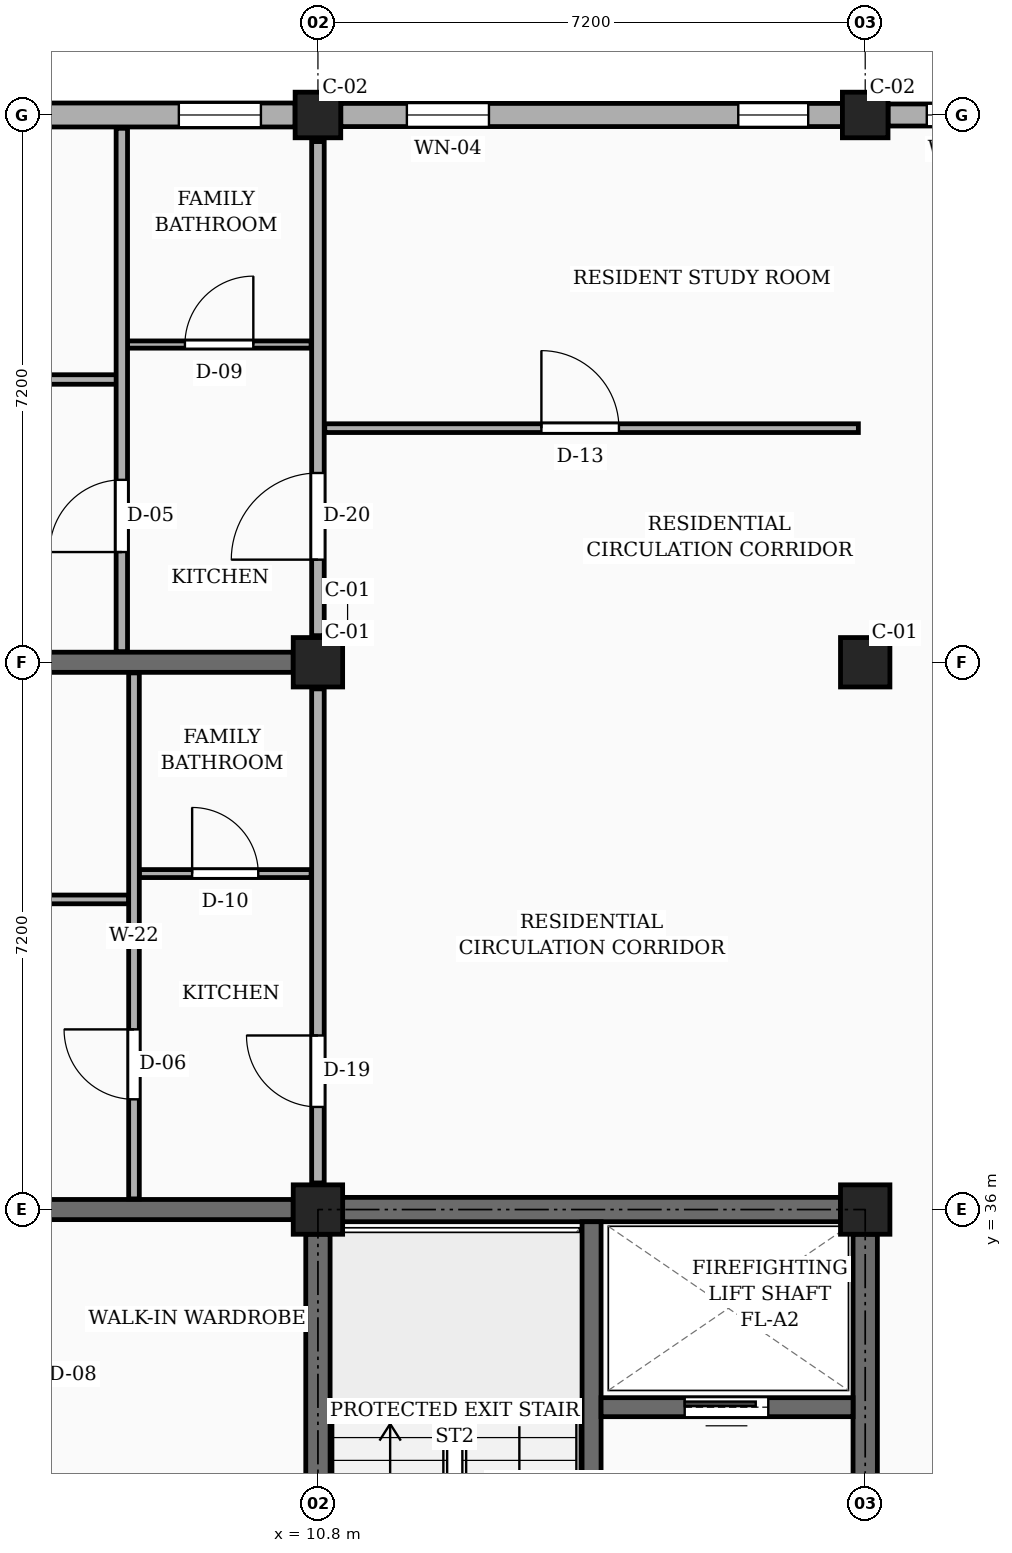
"""IFC4 building model, lengths in metres.
Left out: names, types, materials, properties, quantities, classifications, styles, units other than length and angle.
Written with IfcOpenShell. Run it as: python <this file> out.ifc"""

import sys

from ifc_helpers import new_model, si_unit, direction, frame, frame_2d, origin, origin_2d, place, context, subcontext, project, spatial, rectangle, extrude, element, fill, save


model = new_model("IFC4")
c1 = context("Model", 3, precision=1e-05, world=origin(), true_north=direction((0.0, 1.0)))
c2 = subcontext(c1, "Body", "Model", "MODEL_VIEW")
j1 = project(units=[si_unit("LENGTHUNIT", "METRE"), si_unit("PLANEANGLEUNIT", "RADIAN")], contexts=[c1])
p1 = place(None, origin())
s1 = spatial("IfcSite", under=j1, at=p1, CompositionType="ELEMENT")
p2 = place(p1, origin())
s2 = spatial("IfcBuilding", under=s1, at=p2, CompositionType="ELEMENT")
p3 = place(p2, frame((0.0, 0.0, 4.5)))
s3 = spatial("IfcBuildingStorey", under=s2, at=p3, CompositionType="ELEMENT", Elevation=4.5)
for number, where, z_axis, x_axis in (
    (1, (10.8, 36.0, 0.0), (0.0, 0.0, 1.0), (1.0, 0.0, 0.0)),
    (2, (10.8, 43.2, 0.0), (0.0, 0.0, 1.0), (1.0, 0.0, 0.0)),
):
    element("IfcColumn", number, at=place(p3, frame(where, z_axis=z_axis, x_axis=x_axis)), inside=s3, PredefinedType="COLUMN", context=c2, shape_type="SweptSolid", body=[
        extrude(rectangle(XDim=0.65, YDim=0.65, at=origin_2d()), origin(), (0.0, 0.0, 1.0), 3.15),
    ])
p4 = place(p3, frame((10.8, 50.4, 0.0), z_axis=(0.0, 0.0, 1.0), x_axis=(1.0, 0.0, 0.0)))
e3 = element("IfcColumn", 3, at=p4, inside=s3, PredefinedType="COLUMN", context=c2, shape_type="SweptSolid", body=[
    extrude(rectangle(XDim=0.6, YDim=0.6, at=origin_2d()), origin(), (0.0, 0.0, 1.0), 3.15),
])
for number, where, z_axis, x_axis in (
    (4, (18.0, 36.0, 0.0), (0.0, 0.0, 1.0), (1.0, 0.0, 0.0)),
    (5, (18.0, 43.2, 0.0), (0.0, 0.0, 1.0), (1.0, 0.0, 0.0)),
):
    element("IfcColumn", number, at=place(p3, frame(where, z_axis=z_axis, x_axis=x_axis)), inside=s3, PredefinedType="COLUMN", context=c2, shape_type="SweptSolid", body=[
        extrude(rectangle(XDim=0.65, YDim=0.65, at=origin_2d()), origin(), (0.0, 0.0, 1.0), 3.15),
    ])
p5 = place(p3, frame((18.0, 50.4, 0.0), z_axis=(0.0, 0.0, 1.0), x_axis=(1.0, 0.0, 0.0)))
e6 = element("IfcColumn", 6, at=p5, inside=s3, PredefinedType="COLUMN", context=c2, shape_type="SweptSolid", body=[
    extrude(rectangle(XDim=0.6, YDim=0.6, at=origin_2d()), origin(), (0.0, 0.0, 1.0), 3.15),
])
for number, where, z_axis, x_axis in (
    (7, (3.9, 36.0, 0.0), (0.0, 0.0, 1.0), (1.0, 0.0, 0.0)),
    (8, (3.9, 43.2, 0.0), (0.0, 0.0, 1.0), (1.0, 0.0, 0.0)),
):
    element("IfcWall", number, at=place(p3, frame(where, z_axis=z_axis, x_axis=x_axis)), inside=s3, PredefinedType="SOLIDWALL", context=c2, shape_type="SweptSolid", body=[
        extrude(rectangle(XDim=6.575, YDim=0.265, at=frame_2d((3.288, 0.0))), origin(), (0.0, 0.0, 1.0), 2.17),
    ])
p6 = place(p3, frame((24.9, 50.4, 0.0), z_axis=(0.0, 0.0, 1.0), x_axis=(-1.0, 0.0, 0.0)))
e9 = element("IfcWall", 9, at=p6, inside=s3, PredefinedType="SOLIDWALL", context=c2, shape_type="SweptSolid", body=[
    extrude(rectangle(XDim=6.6, YDim=0.29, at=frame_2d((3.3, 0.0))), origin(), (0.0, 0.0, 1.0), 2.44),
])
p7 = place(p6, frame((1.925, 0.0, 0.78)))
e10 = element("IfcOpeningElement", 10, at=p7, cuts=e9, PredefinedType="OPENING", context=c2, shape_type="SweptSolid", body=[
    extrude(rectangle(XDim=1.45, YDim=1.44, at=frame_2d((0.725, 0.72))), frame((0.0, 0.155, 0.0), z_axis=(0.0, -1.0, 0.0), x_axis=(1.0, 0.0, 0.0)), (0.0, 0.0, 1.0), 0.31),
])
p8 = place(p6, frame((5.17, 0.0, 0.78)))
e11 = element("IfcOpeningElement", 11, at=p8, cuts=e9, PredefinedType="OPENING", context=c2, shape_type="SweptSolid", body=[
    extrude(rectangle(XDim=0.92, YDim=1.15, at=frame_2d((0.46, 0.575))), frame((0.0, 0.155, 0.0), z_axis=(0.0, -1.0, 0.0), x_axis=(1.0, 0.0, 0.0)), (0.0, 0.0, 1.0), 0.31),
])
p9 = place(p3, frame((17.7, 50.4, 0.0), z_axis=(0.0, 0.0, 1.0), x_axis=(-1.0, 0.0, 0.0)))
e12 = element("IfcWall", 12, at=p9, inside=s3, PredefinedType="SOLIDWALL", context=c2, shape_type="SweptSolid", body=[
    extrude(rectangle(XDim=6.6, YDim=0.305, at=frame_2d((3.3, 0.0))), origin(), (0.0, 0.0, 1.0), 2.44),
])
p10 = place(p9, frame((0.45, 0.0, 0.78)))
e13 = element("IfcOpeningElement", 13, at=p10, cuts=e12, PredefinedType="OPENING", context=c2, shape_type="SweptSolid", body=[
    extrude(rectangle(XDim=0.92, YDim=1.15, at=frame_2d((0.46, 0.575))), frame((0.0, 0.163, 0.0), z_axis=(0.0, -1.0, 0.0), x_axis=(1.0, 0.0, 0.0)), (0.0, 0.0, 1.0), 0.325),
])
p11 = place(p9, frame((4.65, 0.0, 0.78)))
e14 = element("IfcOpeningElement", 14, at=p11, cuts=e12, PredefinedType="OPENING", context=c2, shape_type="SweptSolid", body=[
    extrude(rectangle(XDim=1.08, YDim=1.15, at=frame_2d((0.54, 0.575))), frame((0.0, 0.163, 0.0), z_axis=(0.0, -1.0, 0.0), x_axis=(1.0, 0.0, 0.0)), (0.0, 0.0, 1.0), 0.325),
])
p12 = place(p3, frame((10.5, 50.4, 0.0), z_axis=(0.0, 0.0, 1.0), x_axis=(-1.0, 0.0, 0.0)))
e15 = element("IfcWall", 15, at=p12, inside=s3, PredefinedType="SOLIDWALL", context=c2, shape_type="SweptSolid", body=[
    extrude(rectangle(XDim=6.6, YDim=0.315, at=frame_2d((3.3, 0.0))), origin(), (0.0, 0.0, 1.0), 2.44),
])
p13 = place(p12, frame((0.45, 0.0, 0.78)))
e16 = element("IfcOpeningElement", 16, at=p13, cuts=e15, PredefinedType="OPENING", context=c2, shape_type="SweptSolid", body=[
    extrude(rectangle(XDim=1.08, YDim=1.15, at=frame_2d((0.54, 0.575))), frame((0.0, 0.167, 0.0), z_axis=(0.0, -1.0, 0.0), x_axis=(1.0, 0.0, 0.0)), (0.0, 0.0, 1.0), 0.335),
])
p14 = place(p12, frame((4.65, 0.0, 0.78)))
e17 = element("IfcOpeningElement", 17, at=p14, cuts=e15, PredefinedType="OPENING", context=c2, shape_type="SweptSolid", body=[
    extrude(rectangle(XDim=1.24, YDim=1.15, at=frame_2d((0.62, 0.575))), frame((0.0, 0.167, 0.0), z_axis=(0.0, -1.0, 0.0), x_axis=(1.0, 0.0, 0.0)), (0.0, 0.0, 1.0), 0.335),
])
for number, where, z_axis, x_axis in (
    (18, (10.8, 29.125, 0.0), (0.0, 0.0, 1.0), (0.0, 1.0, 0.0)),
    (19, (11.125, 36.0, 0.0), (0.0, 0.0, 1.0), (1.0, 0.0, 0.0)),
):
    element("IfcWall", number, at=place(p3, frame(where, z_axis=z_axis, x_axis=x_axis)), inside=s3, PredefinedType="SHEAR", context=c2, shape_type="SweptSolid", body=[
        extrude(rectangle(XDim=6.55, YDim=0.32, at=frame_2d((3.275, 0.0))), origin(), (0.0, 0.0, 1.0), 2.87),
    ])
p15 = place(p3, frame((18.0, 29.125, 0.0), z_axis=(0.0, 0.0, 1.0), x_axis=(0.0, 1.0, 0.0)))
e20 = element("IfcWall", 20, at=p15, inside=s3, PredefinedType="SHEAR", context=c2, shape_type="SweptSolid", body=[
    extrude(rectangle(XDim=6.55, YDim=0.32, at=frame_2d((3.275, 0.0))), origin(), (0.0, 0.0, 1.0), 2.87),
])
p16 = place(p15, frame((1.5, 0.0, 0.0)))
e21 = element("IfcOpeningElement", 21, at=p16, cuts=e20, PredefinedType="OPENING", context=c2, shape_type="SweptSolid", body=[
    extrude(rectangle(XDim=1.1, YDim=2.15, at=frame_2d((0.55, 1.075))), frame((0.0, 0.17, 0.0), z_axis=(0.0, -1.0, 0.0), x_axis=(1.0, 0.0, 0.0)), (0.0, 0.0, 1.0), 0.34),
])
p17 = place(p3, frame((14.4, 28.96, 0.0), z_axis=(0.0, 0.0, 1.0), x_axis=(0.0, 1.0, 0.0)))
e22 = element("IfcWall", 22, at=p17, inside=s3, PredefinedType="SHEAR", context=c2, shape_type="SweptSolid", body=[
    extrude(rectangle(XDim=6.88, YDim=0.25, at=frame_2d((3.44, 0.0))), origin(), (0.0, 0.0, 1.0), 2.87),
])
p18 = place(p17, frame((0.44, 0.0, 0.0)))
e23 = element("IfcOpeningElement", 23, at=p18, cuts=e22, PredefinedType="OPENING", context=c2, shape_type="SweptSolid", body=[
    extrude(rectangle(XDim=1.05, YDim=2.15, at=frame_2d((0.525, 1.075))), frame((0.0, 0.135, 0.0), z_axis=(0.0, -1.0, 0.0), x_axis=(1.0, 0.0, 0.0)), (0.0, 0.0, 1.0), 0.27),
])
p19 = place(p3, frame((14.525, 33.4, 0.0), z_axis=(0.0, 0.0, 1.0), x_axis=(1.0, 0.0, 0.0)))
e24 = element("IfcWall", 24, at=p19, inside=s3, PredefinedType="SHEAR", context=c2, shape_type="SweptSolid", body=[
    extrude(rectangle(XDim=3.315, YDim=0.25, at=frame_2d((1.658, 0.0))), origin(), (0.0, 0.0, 1.0), 2.87),
])
p20 = place(p19, frame((1.1, 0.0, 0.0)))
e25 = element("IfcOpeningElement", 25, at=p20, cuts=e24, PredefinedType="OPENING", context=c2, shape_type="SweptSolid", body=[
    extrude(rectangle(XDim=1.1, YDim=2.2, at=frame_2d((0.55, 1.1))), frame((0.0, 0.135, 0.0), z_axis=(0.0, -1.0, 0.0), x_axis=(1.0, 0.0, 0.0)), (0.0, 0.0, 1.0), 0.27),
])
p21 = place(p3, frame((10.8, 36.35, 0.0), z_axis=(0.0, 0.0, 1.0), x_axis=(0.0, 1.0, 0.0)))
e26 = element("IfcWall", 26, at=p21, inside=s3, PredefinedType="PARTITIONING", context=c2, shape_type="SweptSolid", body=[
    extrude(rectangle(XDim=6.5, YDim=0.165, at=frame_2d((3.25, 0.0))), origin(), (0.0, 0.0, 1.0), 2.22),
])
p22 = place(p21, frame((1.0, 0.0, 0.0)))
e27 = element("IfcOpeningElement", 27, at=p22, cuts=e26, PredefinedType="OPENING", context=c2, shape_type="SweptSolid", body=[
    extrude(rectangle(XDim=0.94, YDim=2.12, at=frame_2d((0.47, 1.06))), frame((0.0, 0.093, 0.0), z_axis=(0.0, -1.0, 0.0), x_axis=(1.0, 0.0, 0.0)), (0.0, 0.0, 1.0), 0.185),
])
p23 = place(p3, frame((10.8, 43.55, 0.0), z_axis=(0.0, 0.0, 1.0), x_axis=(0.0, 1.0, 0.0)))
e28 = element("IfcWall", 28, at=p23, inside=s3, PredefinedType="PARTITIONING", context=c2, shape_type="SweptSolid", body=[
    extrude(rectangle(XDim=6.5, YDim=0.165, at=frame_2d((3.25, 0.0))), origin(), (0.0, 0.0, 1.0), 2.22),
])
p24 = place(p23, frame((1.0, 0.0, 0.0)))
e29 = element("IfcOpeningElement", 29, at=p24, cuts=e28, PredefinedType="OPENING", context=c2, shape_type="SweptSolid", body=[
    extrude(rectangle(XDim=1.14, YDim=2.18, at=frame_2d((0.57, 1.09))), frame((0.0, 0.093, 0.0), z_axis=(0.0, -1.0, 0.0), x_axis=(1.0, 0.0, 0.0)), (0.0, 0.0, 1.0), 0.185),
])
p25 = place(p3, frame((3.775, 40.08, 0.0), z_axis=(0.0, 0.0, 1.0), x_axis=(1.0, 0.0, 0.0)))
e30 = element("IfcWall", 30, at=p25, inside=s3, PredefinedType="PARTITIONING", context=c2, shape_type="SweptSolid", body=[
    extrude(rectangle(XDim=4.535, YDim=0.115, at=frame_2d((2.268, 0.0))), origin(), (0.0, 0.0, 1.0), 2.305),
])
p26 = place(p25, frame((1.827, 0.0, 0.0)))
e31 = element("IfcOpeningElement", 31, at=p26, cuts=e30, PredefinedType="OPENING", context=c2, shape_type="SweptSolid", body=[
    extrude(rectangle(XDim=0.88, YDim=2.08, at=frame_2d((0.44, 1.04))), frame((0.0, 0.067, 0.0), z_axis=(0.0, -1.0, 0.0), x_axis=(1.0, 0.0, 0.0)), (0.0, 0.0, 1.0), 0.135),
])
p27 = place(p3, frame((8.45, 40.42, 0.0), z_axis=(0.0, 0.0, 1.0), x_axis=(1.0, 0.0, 0.0)))
e32 = element("IfcWall", 32, at=p27, inside=s3, PredefinedType="PARTITIONING", context=c2, shape_type="SweptSolid", body=[
    extrude(rectangle(XDim=2.26, YDim=0.105, at=frame_2d((1.13, 0.0))), origin(), (0.0, 0.0, 1.0), 2.305),
])
p28 = place(p27, frame((0.695, 0.0, 0.0)))
e33 = element("IfcOpeningElement", 33, at=p28, cuts=e32, PredefinedType="OPENING", context=c2, shape_type="SweptSolid", body=[
    extrude(rectangle(XDim=0.87, YDim=2.05, at=frame_2d((0.435, 1.025))), frame((0.0, 0.062, 0.0), z_axis=(0.0, -1.0, 0.0), x_axis=(1.0, 0.0, 0.0)), (0.0, 0.0, 1.0), 0.125),
])
p29 = place(p3, frame((8.38, 36.14, 0.0), z_axis=(0.0, 0.0, 1.0), x_axis=(0.0, 1.0, 0.0)))
e34 = element("IfcWall", 34, at=p29, inside=s3, PredefinedType="PARTITIONING", context=c2, shape_type="SweptSolid", body=[
    extrude(rectangle(XDim=6.92, YDim=0.14, at=frame_2d((3.46, 0.0))), origin(), (0.0, 0.0, 1.0), 2.305),
])
p30 = place(p29, frame((1.31, 0.0, 0.0)))
e35 = element("IfcOpeningElement", 35, at=p30, cuts=e34, PredefinedType="OPENING", context=c2, shape_type="SweptSolid", body=[
    extrude(rectangle(XDim=0.92, YDim=2.1, at=frame_2d((0.46, 1.05))), frame((0.0, 0.08, 0.0), z_axis=(0.0, -1.0, 0.0), x_axis=(1.0, 0.0, 0.0)), (0.0, 0.0, 1.0), 0.16),
])
p31 = place(p3, frame((10.89, 46.28, 0.0), z_axis=(0.0, 0.0, 1.0), x_axis=(1.0, 0.0, 0.0)))
e36 = element("IfcWall", 36, at=p31, inside=s3, PredefinedType="PARTITIONING", context=c2, shape_type="SweptSolid", body=[
    extrude(rectangle(XDim=7.02, YDim=0.115, at=frame_2d((3.51, 0.0))), origin(), (0.0, 0.0, 1.0), 2.305),
])
p32 = place(p31, frame((2.85, 0.0, 0.0)))
e37 = element("IfcOpeningElement", 37, at=p32, cuts=e36, PredefinedType="OPENING", context=c2, shape_type="SweptSolid", body=[
    extrude(rectangle(XDim=1.02, YDim=2.15, at=frame_2d((0.51, 1.075))), frame((0.0, 0.067, 0.0), z_axis=(0.0, -1.0, 0.0), x_axis=(1.0, 0.0, 0.0)), (0.0, 0.0, 1.0), 0.135),
])
p33 = place(p3, frame((3.775, 46.92, 0.0), z_axis=(0.0, 0.0, 1.0), x_axis=(1.0, 0.0, 0.0)))
e38 = element("IfcWall", 38, at=p33, inside=s3, PredefinedType="PARTITIONING", context=c2, shape_type="SweptSolid", body=[
    extrude(rectangle(XDim=4.375, YDim=0.125, at=frame_2d((2.188, 0.0))), origin(), (0.0, 0.0, 1.0), 2.305),
])
p34 = place(p33, frame((1.738, 0.0, 0.0)))
e39 = element("IfcOpeningElement", 39, at=p34, cuts=e38, PredefinedType="OPENING", context=c2, shape_type="SweptSolid", body=[
    extrude(rectangle(XDim=0.9, YDim=2.1, at=frame_2d((0.45, 1.05))), frame((0.0, 0.073, 0.0), z_axis=(0.0, -1.0, 0.0), x_axis=(1.0, 0.0, 0.0)), (0.0, 0.0, 1.0), 0.145),
])
p35 = place(p3, frame((8.29, 47.38, 0.0), z_axis=(0.0, 0.0, 1.0), x_axis=(1.0, 0.0, 0.0)))
e40 = element("IfcWall", 40, at=p35, inside=s3, PredefinedType="PARTITIONING", context=c2, shape_type="SweptSolid", body=[
    extrude(rectangle(XDim=2.42, YDim=0.095, at=frame_2d((1.21, 0.0))), origin(), (0.0, 0.0, 1.0), 2.305),
])
p36 = place(p35, frame((0.76, 0.0, 0.0)))
e41 = element("IfcOpeningElement", 41, at=p36, cuts=e40, PredefinedType="OPENING", context=c2, shape_type="SweptSolid", body=[
    extrude(rectangle(XDim=0.9, YDim=2.05, at=frame_2d((0.45, 1.025))), frame((0.0, 0.058, 0.0), z_axis=(0.0, -1.0, 0.0), x_axis=(1.0, 0.0, 0.0)), (0.0, 0.0, 1.0), 0.115),
])
p37 = place(p3, frame((8.22, 43.34, 0.0), z_axis=(0.0, 0.0, 1.0), x_axis=(0.0, 1.0, 0.0)))
e42 = element("IfcWall", 42, at=p37, inside=s3, PredefinedType="PARTITIONING", context=c2, shape_type="SweptSolid", body=[
    extrude(rectangle(XDim=6.885, YDim=0.15, at=frame_2d((3.442, 0.0))), origin(), (0.0, 0.0, 1.0), 2.305),
])
p38 = place(p37, frame((1.31, 0.0, 0.0)))
e43 = element("IfcOpeningElement", 43, at=p38, cuts=e42, PredefinedType="OPENING", context=c2, shape_type="SweptSolid", body=[
    extrude(rectangle(XDim=0.95, YDim=2.1, at=frame_2d((0.475, 1.05))), frame((0.0, 0.085, 0.0), z_axis=(0.0, -1.0, 0.0), x_axis=(1.0, 0.0, 0.0)), (0.0, 0.0, 1.0), 0.17),
])
p39 = place(p8, origin())
e44 = element("IfcWindow", 44, at=p39, inside=s3, PartitioningType="SINGLE_PANEL", PredefinedType="WINDOW", context=c2, shape_type="SweptSolid", body=[
    extrude(rectangle(XDim=0.92, YDim=1.15, at=frame_2d((0.46, 0.575))), frame((0.0, 0.03, 0.0), z_axis=(0.0, -1.0, 0.0), x_axis=(1.0, 0.0, 0.0)), (0.0, 0.0, 1.0), 0.06),
])
fill(e11, e44)
p40 = place(p10, origin())
e45 = element("IfcWindow", 45, at=p40, inside=s3, PartitioningType="SINGLE_PANEL", PredefinedType="WINDOW", context=c2, shape_type="SweptSolid", body=[
    extrude(rectangle(XDim=0.92, YDim=1.15, at=frame_2d((0.46, 0.575))), frame((0.0, 0.03, 0.0), z_axis=(0.0, -1.0, 0.0), x_axis=(1.0, 0.0, 0.0)), (0.0, 0.0, 1.0), 0.06),
])
fill(e13, e45)
p41 = place(p11, origin())
e46 = element("IfcWindow", 46, at=p41, inside=s3, PartitioningType="SINGLE_PANEL", PredefinedType="WINDOW", context=c2, shape_type="SweptSolid", body=[
    extrude(rectangle(XDim=1.08, YDim=1.15, at=frame_2d((0.54, 0.575))), frame((0.0, 0.03, 0.0), z_axis=(0.0, -1.0, 0.0), x_axis=(1.0, 0.0, 0.0)), (0.0, 0.0, 1.0), 0.06),
])
fill(e14, e46)
p42 = place(p13, origin())
e47 = element("IfcWindow", 47, at=p42, inside=s3, PartitioningType="SINGLE_PANEL", PredefinedType="WINDOW", context=c2, shape_type="SweptSolid", body=[
    extrude(rectangle(XDim=1.08, YDim=1.15, at=frame_2d((0.54, 0.575))), frame((0.0, 0.03, 0.0), z_axis=(0.0, -1.0, 0.0), x_axis=(1.0, 0.0, 0.0)), (0.0, 0.0, 1.0), 0.06),
])
fill(e16, e47)
p43 = place(p20, origin())
e48 = element("IfcDoor", 48, at=p43, inside=s3, OperationType="SLIDING_TO_LEFT", PredefinedType="DOOR", context=c2, shape_type="SweptSolid", body=[
    extrude(rectangle(XDim=1.1, YDim=2.2, at=frame_2d((0.55, 1.1))), frame((0.0, 0.025, 0.0), z_axis=(0.0, -1.0, 0.0), x_axis=(1.0, 0.0, 0.0)), (0.0, 0.0, 1.0), 0.05),
])
fill(e25, e48)
p44 = place(p22, origin())
e49 = element("IfcDoor", 49, at=p44, inside=s3, OperationType="SINGLE_SWING_RIGHT", PredefinedType="DOOR", context=c2, shape_type="SweptSolid", body=[
    extrude(rectangle(XDim=0.94, YDim=2.12, at=frame_2d((0.47, 1.06))), frame((0.0, 0.025, 0.0), z_axis=(0.0, -1.0, 0.0), x_axis=(1.0, 0.0, 0.0)), (0.0, 0.0, 1.0), 0.05),
])
fill(e27, e49)
p45 = place(p24, origin())
e50 = element("IfcDoor", 50, at=p45, inside=s3, OperationType="SINGLE_SWING_LEFT", PredefinedType="DOOR", context=c2, shape_type="SweptSolid", body=[
    extrude(rectangle(XDim=1.14, YDim=2.18, at=frame_2d((0.57, 1.09))), frame((0.0, 0.025, 0.0), z_axis=(0.0, -1.0, 0.0), x_axis=(1.0, 0.0, 0.0)), (0.0, 0.0, 1.0), 0.05),
])
fill(e29, e50)
p46 = place(p28, origin())
e51 = element("IfcDoor", 51, at=p46, inside=s3, OperationType="SINGLE_SWING_LEFT", PredefinedType="DOOR", context=c2, shape_type="SweptSolid", body=[
    extrude(rectangle(XDim=0.87, YDim=2.05, at=frame_2d((0.435, 1.025))), frame((0.0, 0.025, 0.0), z_axis=(0.0, -1.0, 0.0), x_axis=(1.0, 0.0, 0.0)), (0.0, 0.0, 1.0), 0.05),
])
fill(e33, e51)
p47 = place(p30, origin())
e52 = element("IfcDoor", 52, at=p47, inside=s3, OperationType="SINGLE_SWING_RIGHT", PredefinedType="DOOR", context=c2, shape_type="SweptSolid", body=[
    extrude(rectangle(XDim=0.92, YDim=2.1, at=frame_2d((0.46, 1.05))), frame((0.0, 0.025, 0.0), z_axis=(0.0, -1.0, 0.0), x_axis=(1.0, 0.0, 0.0)), (0.0, 0.0, 1.0), 0.05),
])
fill(e35, e52)
p48 = place(p32, origin())
e53 = element("IfcDoor", 53, at=p48, inside=s3, OperationType="SINGLE_SWING_LEFT", PredefinedType="DOOR", context=c2, shape_type="SweptSolid", body=[
    extrude(rectangle(XDim=1.02, YDim=2.15, at=frame_2d((0.51, 1.075))), frame((0.0, 0.025, 0.0), z_axis=(0.0, -1.0, 0.0), x_axis=(1.0, 0.0, 0.0)), (0.0, 0.0, 1.0), 0.05),
])
fill(e37, e53)
p49 = place(p36, origin())
e54 = element("IfcDoor", 54, at=p49, inside=s3, OperationType="SINGLE_SWING_RIGHT", PredefinedType="DOOR", context=c2, shape_type="SweptSolid", body=[
    extrude(rectangle(XDim=0.9, YDim=2.05, at=frame_2d((0.45, 1.025))), frame((0.0, 0.025, 0.0), z_axis=(0.0, -1.0, 0.0), x_axis=(1.0, 0.0, 0.0)), (0.0, 0.0, 1.0), 0.05),
])
fill(e41, e54)
p50 = place(p38, origin())
e55 = element("IfcDoor", 55, at=p50, inside=s3, OperationType="SINGLE_SWING_LEFT", PredefinedType="DOOR", context=c2, shape_type="SweptSolid", body=[
    extrude(rectangle(XDim=0.95, YDim=2.1, at=frame_2d((0.475, 1.05))), frame((0.0, 0.025, 0.0), z_axis=(0.0, -1.0, 0.0), x_axis=(1.0, 0.0, 0.0)), (0.0, 0.0, 1.0), 0.05),
])
fill(e43, e55)
save(model, sys.argv[1])
